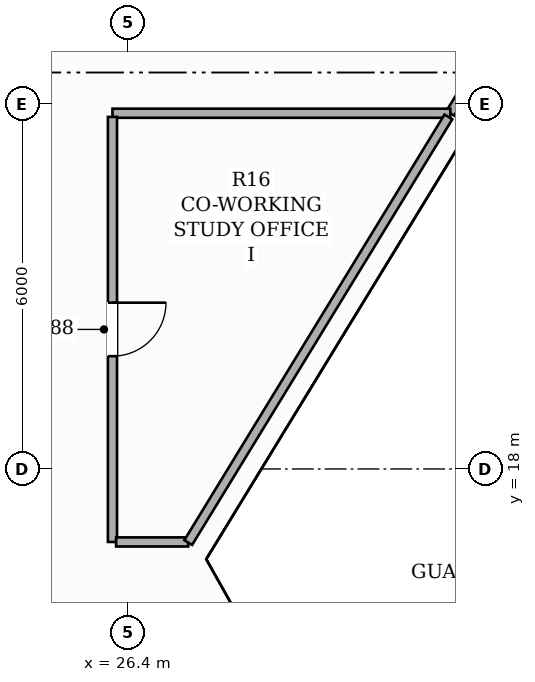
"""IFC4 building model, lengths in metres.
Left out: names, types, materials, properties, quantities, classifications, styles, units other than length and angle.
Written with IfcOpenShell. Run it as: python <this file> out.ifc"""

import sys

from ifc_helpers import new_model, si_unit, direction, frame, frame_2d, origin, place, context, subcontext, project, spatial, rectangle, extrude, element, fill, save


model = new_model("IFC4")
c1 = context("Model", 3, precision=1e-05, world=origin(), true_north=direction((0.0, 1.0)))
c2 = subcontext(c1, "Body", "Model", "MODEL_VIEW")
j1 = project(units=[si_unit("LENGTHUNIT", "METRE"), si_unit("PLANEANGLEUNIT", "RADIAN")], contexts=[c1])
p1 = place(None, origin())
s1 = spatial("IfcSite", under=j1, at=p1, CompositionType="ELEMENT")
p2 = place(p1, origin())
s2 = spatial("IfcBuilding", under=s1, at=p2, CompositionType="ELEMENT")
p3 = place(p2, frame((0.0, 0.0, 93.95)))
s3 = spatial("IfcBuildingStorey", under=s2, at=p3, CompositionType="ELEMENT", Elevation=93.95)
p4 = place(p3, frame((32.156, 24.577, 0.0), z_axis=(0.0, 0.0, 1.0), x_axis=(-0.526374279241, -0.850252973034, 0.0)))
e1 = element("IfcWall", 1, at=p4, inside=s3, PredefinedType="PARTITIONING", context=c2, shape_type="SweptSolid", body=[
    extrude(rectangle(XDim=0.855, YDim=0.15, at=frame_2d((0.427, 0.0))), origin(), (0.0, 0.0, 1.0), 3.02),
])
p5 = place(p3, frame((31.706, 23.85, 0.0), z_axis=(0.0, 0.0, 1.0), x_axis=(-1.0, 0.0, 0.0)))
e2 = element("IfcWall", 2, at=p5, inside=s3, PredefinedType="PARTITIONING", context=c2, shape_type="SweptSolid", body=[
    extrude(rectangle(XDim=5.556, YDim=0.15, at=frame_2d((2.778, 0.0))), origin(), (0.0, 0.0, 1.0), 2.629),
])
p6 = place(p3, frame((26.15, 23.79, 0.0), z_axis=(0.0, 0.0, 1.0), x_axis=(0.0, -1.0, 0.0)))
e3 = element("IfcWall", 3, at=p6, inside=s3, PredefinedType="PARTITIONING", context=c2, shape_type="SweptSolid", body=[
    extrude(rectangle(XDim=6.99, YDim=0.15, at=frame_2d((3.495, 0.0))), origin(), (0.0, 0.0, 1.0), 2.629),
])
p7 = place(p6, frame((3.055, 0.0, 0.0)))
e4 = element("IfcOpeningElement", 4, at=p7, cuts=e3, PredefinedType="OPENING", context=c2, shape_type="SweptSolid", body=[
    extrude(rectangle(XDim=0.88, YDim=2.1, at=frame_2d((0.44, 1.05))), frame((0.0, 0.085, 0.0), z_axis=(0.0, -1.0, 0.0), x_axis=(1.0, 0.0, 0.0)), (0.0, 0.0, 1.0), 0.17),
])
p8 = place(p3, frame((26.21, 16.8, 0.0), z_axis=(0.0, 0.0, 1.0), x_axis=(1.0, 0.0, 0.0)))
e5 = element("IfcWall", 5, at=p8, inside=s3, PredefinedType="PARTITIONING", context=c2, shape_type="SweptSolid", body=[
    extrude(rectangle(XDim=1.186, YDim=0.15, at=frame_2d((0.593, 0.0))), origin(), (0.0, 0.0, 1.0), 3.02),
])
p9 = place(p3, frame((27.396, 16.79, 0.0), z_axis=(0.0, 0.0, 1.0), x_axis=(0.521563150989, 0.8532126813, 0.0)))
e6 = element("IfcWall", 6, at=p9, inside=s3, PredefinedType="PARTITIONING", context=c2, shape_type="SweptSolid", body=[
    extrude(rectangle(XDim=8.204, YDim=0.15, at=frame_2d((4.102, 0.0))), origin(), (0.0, 0.0, 1.0), 2.629),
])
p10 = place(p7, origin())
e7 = element("IfcDoor", 7, at=p10, inside=s3, OperationType="SINGLE_SWING_LEFT", PredefinedType="DOOR", context=c2, shape_type="SweptSolid", body=[
    extrude(rectangle(XDim=0.88, YDim=2.1, at=frame_2d((0.44, 1.05))), frame((0.0, 0.025, 0.0), z_axis=(0.0, -1.0, 0.0), x_axis=(1.0, 0.0, 0.0)), (0.0, 0.0, 1.0), 0.05),
])
fill(e4, e7)
save(model, sys.argv[1])
